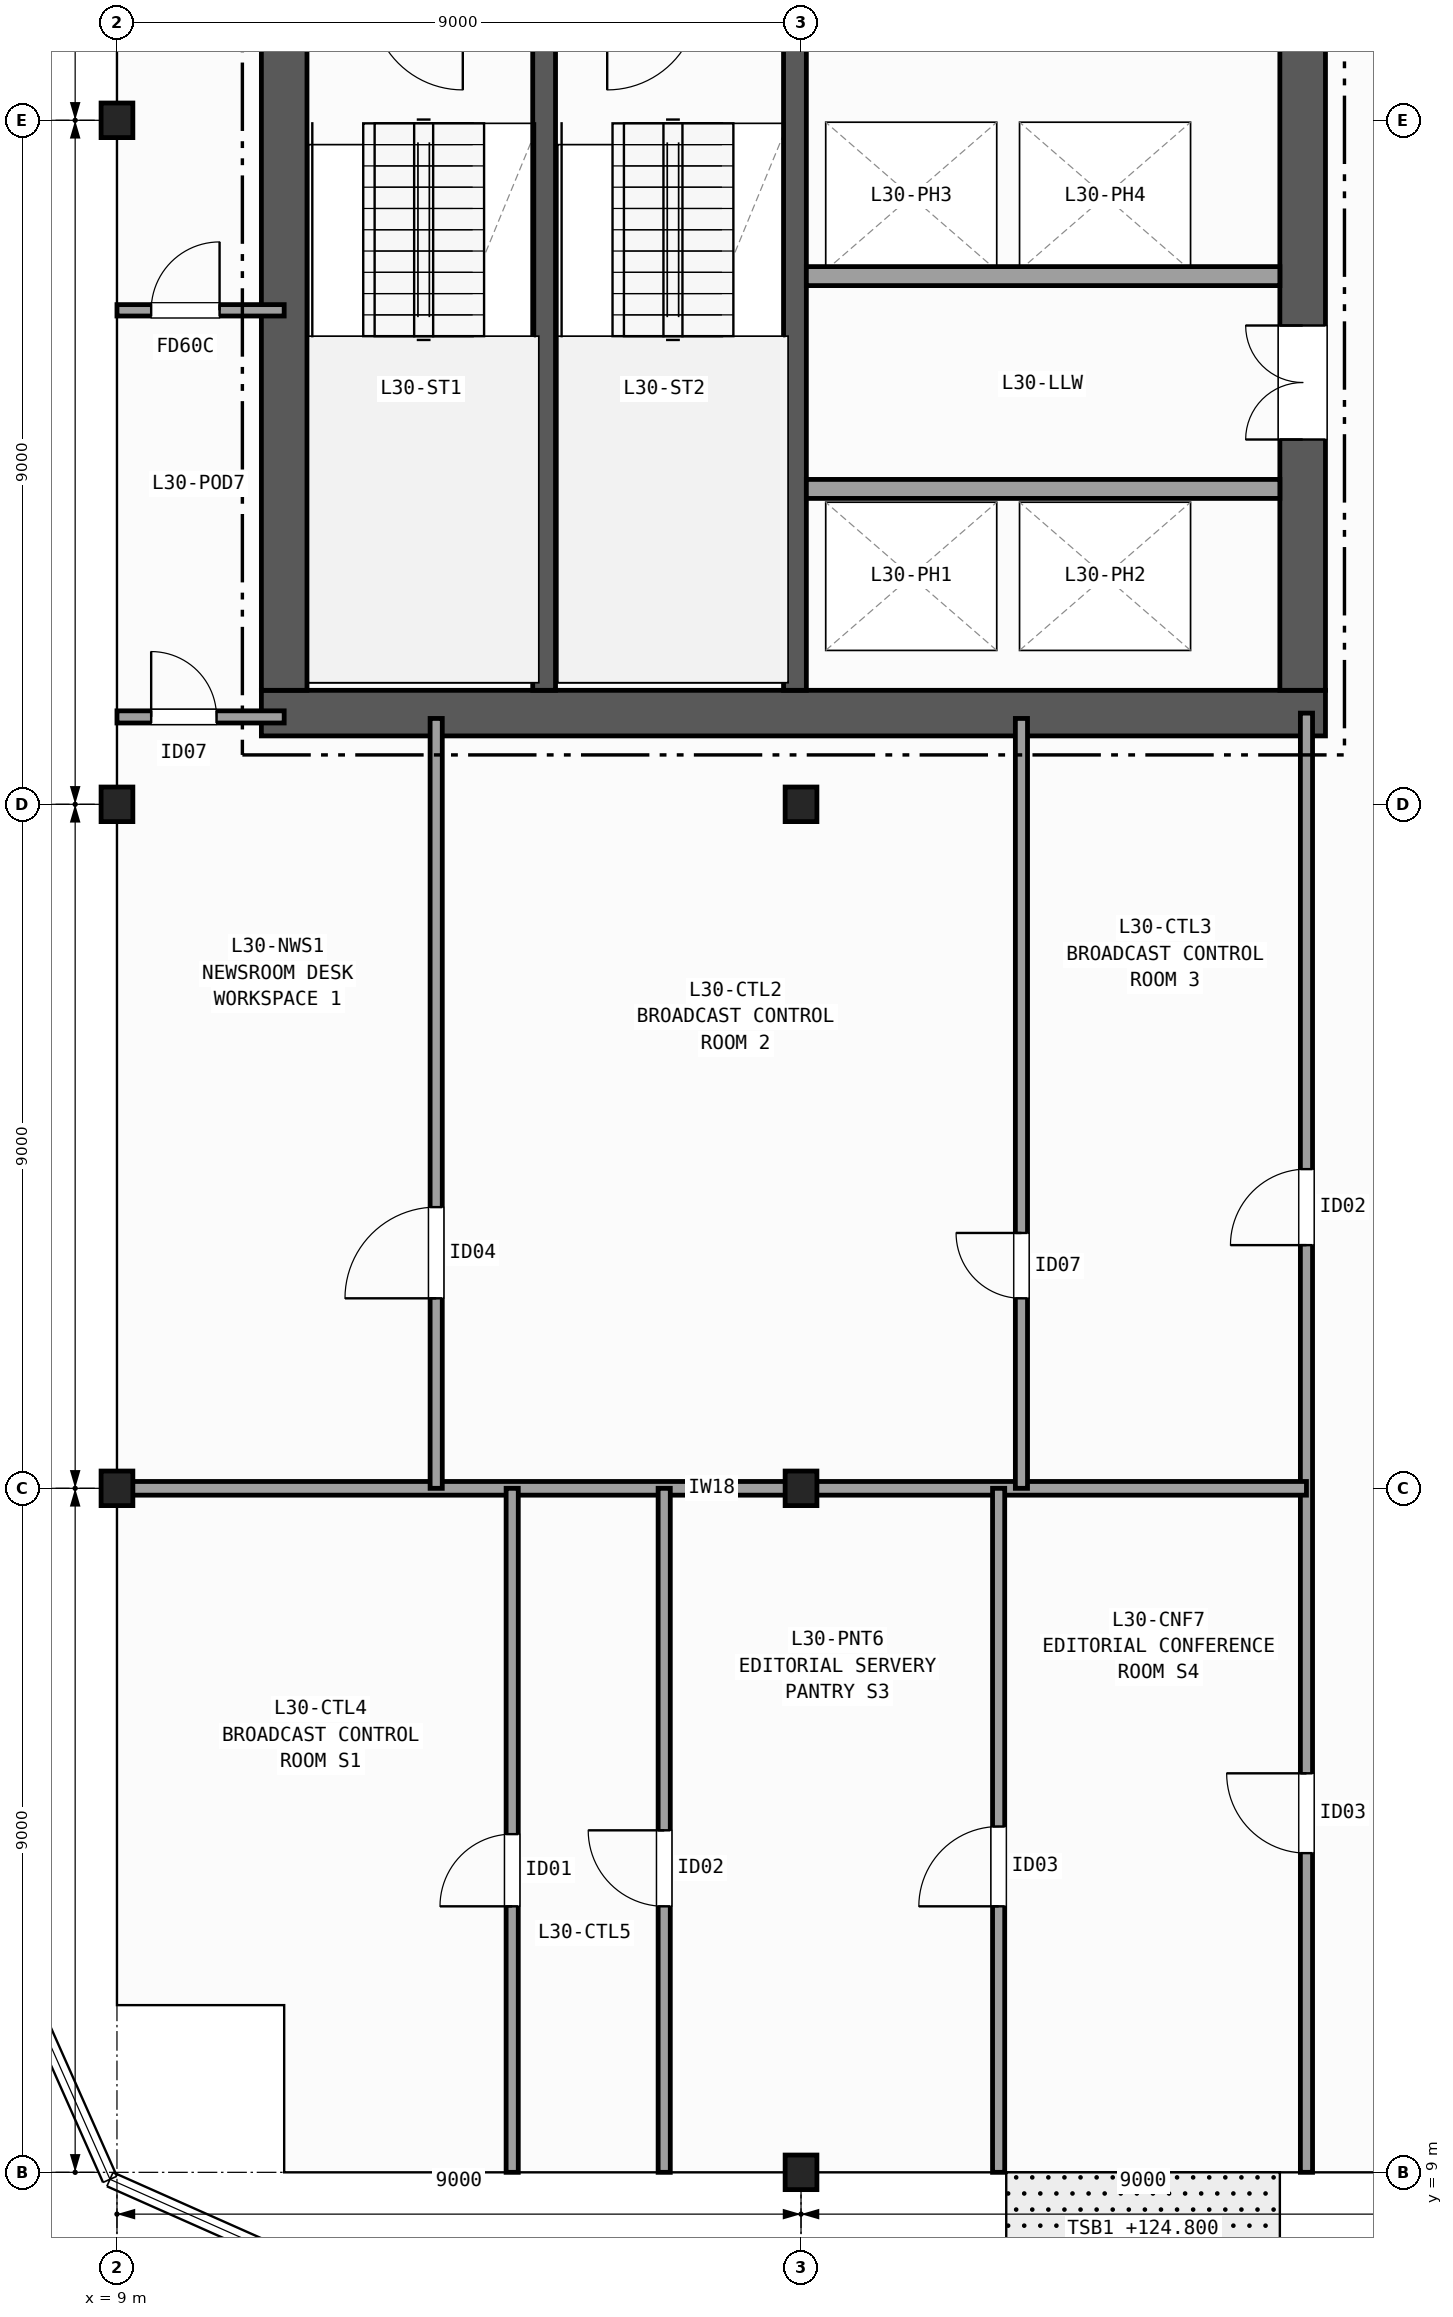
"""IFC4 building model, lengths in metres.
Left out: names, types, materials, properties, quantities, classifications, styles, units other than length and angle.
Written with IfcOpenShell. Run it as: python <this file> out.ifc"""

import sys

from ifc_helpers import new_model, si_unit, direction, frame, frame_2d, origin, origin_2d, place, context, subcontext, project, spatial, rectangle, i_section, extrude, element, fill, save


model = new_model("IFC4")
c1 = context("Model", 3, precision=1e-05, world=origin(), true_north=direction((0.0, 1.0)))
c2 = subcontext(c1, "Body", "Model", "MODEL_VIEW")
j1 = project(units=[si_unit("LENGTHUNIT", "METRE"), si_unit("PLANEANGLEUNIT", "RADIAN")], contexts=[c1])
p1 = place(None, origin())
s1 = spatial("IfcSite", under=j1, at=p1, CompositionType="ELEMENT")
p2 = place(p1, origin())
s2 = spatial("IfcBuilding", under=s1, at=p2, CompositionType="ELEMENT")
p3 = place(p2, frame((0.0, 0.0, 124.8)))
s3 = spatial("IfcBuildingStorey", under=s2, at=p3, CompositionType="ELEMENT", Elevation=124.8)
for number, where, z_axis, x_axis in (
    (1, (9.0, 18.0, 0.0), (0.0, 0.0, 1.0), (1.0, 0.0, 0.0)),
    (2, (9.0, 27.0, 0.0), (0.0, 0.0, 1.0), (1.0, 0.0, 0.0)),
    (3, (9.0, 36.0, 0.0), (0.0, 0.0, 1.0), (1.0, 0.0, 0.0)),
    (4, (18.0, 9.0, 0.0), (0.0, 0.0, 1.0), (1.0, 0.0, 0.0)),
    (5, (18.0, 18.0, 0.0), (0.0, 0.0, 1.0), (1.0, 0.0, 0.0)),
    (6, (18.0, 27.0, 0.0), (0.0, 0.0, 1.0), (1.0, 0.0, 0.0)),
):
    element("IfcColumn", number, at=place(p3, frame(where, z_axis=z_axis, x_axis=x_axis)), inside=s3, PredefinedType="COLUMN", context=c2, shape_type="SweptSolid", body=[
        extrude(i_section(OverallWidth=0.418, OverallDepth=0.455, WebThickness=0.042, FlangeThickness=0.068, FilletRadius=0.015, at=origin_2d()), origin(), (0.0, 0.0, 1.0), 3.7),
    ])
p4 = place(p3, frame((10.9, 28.2, 0.0), z_axis=(0.0, 0.0, 1.0), x_axis=(1.0, 0.0, 0.0)))
e7 = element("IfcWall", 7, at=p4, inside=s3, PredefinedType="SHEAR", context=c2, shape_type="SweptSolid", body=[
    extrude(rectangle(XDim=14.0, YDim=0.6, at=frame_2d((7.0, 0.0))), origin(), (0.0, 0.0, 1.0), 3.42),
])
p5 = place(p3, frame((11.2, 42.1, 0.0), z_axis=(0.0, 0.0, 1.0), x_axis=(0.0, -1.0, 0.0)))
e8 = element("IfcWall", 8, at=p5, inside=s3, PredefinedType="SHEAR", context=c2, shape_type="SweptSolid", body=[
    extrude(rectangle(XDim=13.6, YDim=0.6, at=frame_2d((6.8, 0.0))), origin(), (0.0, 0.0, 1.0), 3.42),
])
p6 = place(p3, frame((24.6, 28.5, 0.0), z_axis=(0.0, 0.0, 1.0), x_axis=(0.0, 1.0, 0.0)))
e9 = element("IfcWall", 9, at=p6, inside=s3, PredefinedType="SHEAR", context=c2, shape_type="SweptSolid", body=[
    extrude(rectangle(XDim=13.6, YDim=0.6, at=frame_2d((6.8, 0.0))), origin(), (0.0, 0.0, 1.0), 3.42),
])
p7 = place(p6, frame((3.3, 0.0, 0.0)))
e10 = element("IfcOpeningElement", 10, at=p7, cuts=e9, PredefinedType="OPENING", context=c2, shape_type="SweptSolid", body=[
    extrude(rectangle(XDim=1.5, YDim=2.2, at=frame_2d((0.75, 1.1))), frame((0.0, 0.31, 0.0), z_axis=(0.0, -1.0, 0.0), x_axis=(1.0, 0.0, 0.0)), (0.0, 0.0, 1.0), 0.62),
])
p8 = place(p6, frame((9.9, 0.0, 0.0)))
e11 = element("IfcOpeningElement", 11, at=p8, cuts=e9, PredefinedType="OPENING", context=c2, shape_type="SweptSolid", body=[
    extrude(rectangle(XDim=0.9, YDim=2.1, at=frame_2d((0.45, 1.05))), frame((0.0, 0.31, 0.0), z_axis=(0.0, -1.0, 0.0), x_axis=(1.0, 0.0, 0.0)), (0.0, 0.0, 1.0), 0.62),
])
p9 = place(p6, frame((12.0, 0.0, 0.0)))
e12 = element("IfcOpeningElement", 12, at=p9, cuts=e9, PredefinedType="OPENING", context=c2, shape_type="SweptSolid", body=[
    extrude(rectangle(XDim=0.9, YDim=2.1, at=frame_2d((0.45, 1.05))), frame((0.0, 0.31, 0.0), z_axis=(0.0, -1.0, 0.0), x_axis=(1.0, 0.0, 0.0)), (0.0, 0.0, 1.0), 0.62),
])
p10 = place(p3, frame((14.62, 28.5, 0.0), z_axis=(0.0, 0.0, 1.0), x_axis=(0.0, 1.0, 0.0)))
e13 = element("IfcWall", 13, at=p10, inside=s3, PredefinedType="SHEAR", context=c2, shape_type="SweptSolid", body=[
    extrude(rectangle(XDim=8.95, YDim=0.3, at=frame_2d((4.475, 0.0))), origin(), (0.0, 0.0, 1.0), 3.42),
])
p11 = place(p3, frame((17.92, 42.1, 0.0), z_axis=(0.0, 0.0, 1.0), x_axis=(0.0, -1.0, 0.0)))
e14 = element("IfcWall", 14, at=p11, inside=s3, PredefinedType="SHEAR", context=c2, shape_type="SweptSolid", body=[
    extrude(rectangle(XDim=13.6, YDim=0.3, at=frame_2d((6.8, 0.0))), origin(), (0.0, 0.0, 1.0), 3.42),
])
p12 = place(p11, frame((1.925, 0.0, 0.0)))
e15 = element("IfcOpeningElement", 15, at=p12, cuts=e14, PredefinedType="OPENING", context=c2, shape_type="SweptSolid", body=[
    extrude(rectangle(XDim=1.15, YDim=2.15, at=frame_2d((0.575, 1.075))), frame((0.0, 0.16, 0.0), z_axis=(0.0, -1.0, 0.0), x_axis=(1.0, 0.0, 0.0)), (0.0, 0.0, 1.0), 0.32),
])
for number, where, z_axis, x_axis in (
    (16, (18.07, 31.15, 0.0), (0.0, 0.0, 1.0), (1.0, 0.0, 0.0)),
    (17, (24.3, 33.95, 0.0), (0.0, 0.0, 1.0), (-1.0, 0.0, 0.0)),
):
    element("IfcWall", number, at=place(p3, frame(where, z_axis=z_axis, x_axis=x_axis)), inside=s3, PredefinedType="PARTITIONING", context=c2, shape_type="SweptSolid", body=[
        extrude(rectangle(XDim=6.23, YDim=0.25, at=frame_2d((3.115, 0.0))), origin(), (0.0, 0.0, 1.0), 3.42),
    ])
p13 = place(p3, frame((9.0, 28.15, 0.0), z_axis=(0.0, 0.0, 1.0), x_axis=(1.0, 0.0, 0.0)))
e18 = element("IfcWall", 18, at=p13, inside=s3, PredefinedType="PARTITIONING", context=c2, shape_type="SweptSolid", body=[
    extrude(rectangle(XDim=2.2, YDim=0.16, at=frame_2d((1.1, 0.0))), origin(), (0.0, 0.0, 1.0), 2.634),
])
p14 = place(p13, frame((0.45, 0.0, 0.0)))
e19 = element("IfcOpeningElement", 19, at=p14, cuts=e18, PredefinedType="OPENING", context=c2, shape_type="SweptSolid", body=[
    extrude(rectangle(XDim=0.86, YDim=2.05, at=frame_2d((0.43, 1.025))), frame((0.0, 0.09, 0.0), z_axis=(0.0, -1.0, 0.0), x_axis=(1.0, 0.0, 0.0)), (0.0, 0.0, 1.0), 0.18),
])
p15 = place(p3, frame((9.0, 33.5, 0.0), z_axis=(0.0, 0.0, 1.0), x_axis=(1.0, 0.0, 0.0)))
e20 = element("IfcWall", 20, at=p15, inside=s3, PredefinedType="PARTITIONING", context=c2, shape_type="SweptSolid", body=[
    extrude(rectangle(XDim=2.2, YDim=0.15, at=frame_2d((1.1, 0.0))), origin(), (0.0, 0.0, 1.0), 2.634),
])
p16 = place(p15, frame((0.45, 0.0, 0.0)))
e21 = element("IfcOpeningElement", 21, at=p16, cuts=e20, PredefinedType="OPENING", context=c2, shape_type="SweptSolid", body=[
    extrude(rectangle(XDim=0.9, YDim=2.1, at=frame_2d((0.45, 1.05))), frame((0.0, 0.085, 0.0), z_axis=(0.0, -1.0, 0.0), x_axis=(1.0, 0.0, 0.0)), (0.0, 0.0, 1.0), 0.17),
])
p17 = place(p3, frame((24.65, 9.0, 0.0), z_axis=(0.0, 0.0, 1.0), x_axis=(0.0, 1.0, 0.0)))
e22 = element("IfcWall", 22, at=p17, inside=s3, PredefinedType="PARTITIONING", context=c2, shape_type="SweptSolid", body=[
    extrude(rectangle(XDim=19.2, YDim=0.16, at=frame_2d((9.6, 0.0))), origin(), (0.0, 0.0, 1.0), 2.634),
])
p18 = place(p17, frame((12.2, 0.0, 0.0)))
e23 = element("IfcOpeningElement", 23, at=p18, cuts=e22, PredefinedType="OPENING", context=c2, shape_type="SweptSolid", body=[
    extrude(rectangle(XDim=1.0, YDim=2.1, at=frame_2d((0.5, 1.05))), frame((0.0, 0.09, 0.0), z_axis=(0.0, -1.0, 0.0), x_axis=(1.0, 0.0, 0.0)), (0.0, 0.0, 1.0), 0.18),
])
p19 = place(p17, frame((4.2, 0.0, 0.0)))
e24 = element("IfcOpeningElement", 24, at=p19, cuts=e22, PredefinedType="OPENING", context=c2, shape_type="SweptSolid", body=[
    extrude(rectangle(XDim=1.05, YDim=2.15, at=frame_2d((0.525, 1.075))), frame((0.0, 0.09, 0.0), z_axis=(0.0, -1.0, 0.0), x_axis=(1.0, 0.0, 0.0)), (0.0, 0.0, 1.0), 0.18),
])
p20 = place(p3, frame((9.0, 18.0, 0.0), z_axis=(0.0, 0.0, 1.0), x_axis=(1.0, 0.0, 0.0)))
e25 = element("IfcWall", 25, at=p20, inside=s3, PredefinedType="PARTITIONING", context=c2, shape_type="SweptSolid", body=[
    extrude(rectangle(XDim=15.65, YDim=0.18, at=frame_2d((7.825, 0.0))), origin(), (0.0, 0.0, 1.0), 2.634),
])
p21 = place(p3, frame((13.2, 18.0, 0.0), z_axis=(0.0, 0.0, 1.0), x_axis=(0.0, 1.0, 0.0)))
e26 = element("IfcWall", 26, at=p21, inside=s3, PredefinedType="PARTITIONING", context=c2, shape_type="SweptSolid", body=[
    extrude(rectangle(XDim=10.13, YDim=0.16, at=frame_2d((5.065, 0.0))), origin(), (0.0, 0.0, 1.0), 2.789),
])
p22 = place(p21, frame((2.5, 0.0, 0.0)))
e27 = element("IfcOpeningElement", 27, at=p22, cuts=e26, PredefinedType="OPENING", context=c2, shape_type="SweptSolid", body=[
    extrude(rectangle(XDim=1.2, YDim=2.15, at=frame_2d((0.6, 1.075))), frame((0.0, 0.09, 0.0), z_axis=(0.0, -1.0, 0.0), x_axis=(1.0, 0.0, 0.0)), (0.0, 0.0, 1.0), 0.18),
])
p23 = place(p3, frame((20.9, 18.0, 0.0), z_axis=(0.0, 0.0, 1.0), x_axis=(0.0, 1.0, 0.0)))
e28 = element("IfcWall", 28, at=p23, inside=s3, PredefinedType="PARTITIONING", context=c2, shape_type="SweptSolid", body=[
    extrude(rectangle(XDim=10.13, YDim=0.16, at=frame_2d((5.065, 0.0))), origin(), (0.0, 0.0, 1.0), 2.789),
])
p24 = place(p23, frame((2.5, 0.0, 0.0)))
e29 = element("IfcOpeningElement", 29, at=p24, cuts=e28, PredefinedType="OPENING", context=c2, shape_type="SweptSolid", body=[
    extrude(rectangle(XDim=0.86, YDim=2.05, at=frame_2d((0.43, 1.025))), frame((0.0, 0.09, 0.0), z_axis=(0.0, -1.0, 0.0), x_axis=(1.0, 0.0, 0.0)), (0.0, 0.0, 1.0), 0.18),
])
p25 = place(p3, frame((14.2, 9.0, 0.0), z_axis=(0.0, 0.0, 1.0), x_axis=(0.0, 1.0, 0.0)))
e30 = element("IfcWall", 30, at=p25, inside=s3, PredefinedType="PARTITIONING", context=c2, shape_type="SweptSolid", body=[
    extrude(rectangle(XDim=9.0, YDim=0.16, at=frame_2d((4.5, 0.0))), origin(), (0.0, 0.0, 1.0), 2.789),
])
p26 = place(p25, frame((3.5, 0.0, 0.0)))
e31 = element("IfcOpeningElement", 31, at=p26, cuts=e30, PredefinedType="OPENING", context=c2, shape_type="SweptSolid", body=[
    extrude(rectangle(XDim=0.95, YDim=2.1, at=frame_2d((0.475, 1.05))), frame((0.0, 0.09, 0.0), z_axis=(0.0, -1.0, 0.0), x_axis=(1.0, 0.0, 0.0)), (0.0, 0.0, 1.0), 0.18),
])
p27 = place(p3, frame((16.2, 9.0, 0.0), z_axis=(0.0, 0.0, 1.0), x_axis=(0.0, 1.0, 0.0)))
e32 = element("IfcWall", 32, at=p27, inside=s3, PredefinedType="PARTITIONING", context=c2, shape_type="SweptSolid", body=[
    extrude(rectangle(XDim=9.0, YDim=0.16, at=frame_2d((4.5, 0.0))), origin(), (0.0, 0.0, 1.0), 2.789),
])
p28 = place(p27, frame((3.5, 0.0, 0.0)))
e33 = element("IfcOpeningElement", 33, at=p28, cuts=e32, PredefinedType="OPENING", context=c2, shape_type="SweptSolid", body=[
    extrude(rectangle(XDim=1.0, YDim=2.1, at=frame_2d((0.5, 1.05))), frame((0.0, 0.09, 0.0), z_axis=(0.0, -1.0, 0.0), x_axis=(1.0, 0.0, 0.0)), (0.0, 0.0, 1.0), 0.18),
])
p29 = place(p3, frame((20.6, 9.0, 0.0), z_axis=(0.0, 0.0, 1.0), x_axis=(0.0, 1.0, 0.0)))
e34 = element("IfcWall", 34, at=p29, inside=s3, PredefinedType="PARTITIONING", context=c2, shape_type="SweptSolid", body=[
    extrude(rectangle(XDim=9.0, YDim=0.16, at=frame_2d((4.5, 0.0))), origin(), (0.0, 0.0, 1.0), 2.634),
])
p30 = place(p29, frame((3.5, 0.0, 0.0)))
e35 = element("IfcOpeningElement", 35, at=p30, cuts=e34, PredefinedType="OPENING", context=c2, shape_type="SweptSolid", body=[
    extrude(rectangle(XDim=1.05, YDim=2.15, at=frame_2d((0.525, 1.075))), frame((0.0, 0.09, 0.0), z_axis=(0.0, -1.0, 0.0), x_axis=(1.0, 0.0, 0.0)), (0.0, 0.0, 1.0), 0.18),
])
p31 = place(p7, origin())
e36 = element("IfcDoor", 36, at=p31, inside=s3, OperationType="DOUBLE_DOOR_SINGLE_SWING", PredefinedType="DOOR", context=c2, shape_type="SweptSolid", body=[
    extrude(rectangle(XDim=1.5, YDim=2.2, at=frame_2d((0.75, 1.1))), frame((0.0, 0.025, 0.0), z_axis=(0.0, -1.0, 0.0), x_axis=(1.0, 0.0, 0.0)), (0.0, 0.0, 1.0), 0.05),
])
fill(e10, e36)
p32 = place(p14, origin())
e37 = element("IfcDoor", 37, at=p32, inside=s3, OperationType="SINGLE_SWING_LEFT", PredefinedType="DOOR", context=c2, shape_type="SweptSolid", body=[
    extrude(rectangle(XDim=0.86, YDim=2.05, at=frame_2d((0.43, 1.025))), frame((0.0, 0.025, 0.0), z_axis=(0.0, -1.0, 0.0), x_axis=(1.0, 0.0, 0.0)), (0.0, 0.0, 1.0), 0.05),
])
fill(e19, e37)
p33 = place(p16, origin())
e38 = element("IfcDoor", 38, at=p33, inside=s3, OperationType="SINGLE_SWING_RIGHT", PredefinedType="DOOR", context=c2, shape_type="SweptSolid", body=[
    extrude(rectangle(XDim=0.9, YDim=2.1, at=frame_2d((0.45, 1.05))), frame((0.0, 0.025, 0.0), z_axis=(0.0, -1.0, 0.0), x_axis=(1.0, 0.0, 0.0)), (0.0, 0.0, 1.0), 0.05),
])
fill(e21, e38)
p34 = place(p18, origin())
e39 = element("IfcDoor", 39, at=p34, inside=s3, OperationType="SINGLE_SWING_LEFT", PredefinedType="DOOR", context=c2, shape_type="SweptSolid", body=[
    extrude(rectangle(XDim=1.0, YDim=2.1, at=frame_2d((0.5, 1.05))), frame((0.0, 0.025, 0.0), z_axis=(0.0, -1.0, 0.0), x_axis=(1.0, 0.0, 0.0)), (0.0, 0.0, 1.0), 0.05),
])
fill(e23, e39)
p35 = place(p19, origin())
e40 = element("IfcDoor", 40, at=p35, inside=s3, OperationType="SINGLE_SWING_RIGHT", PredefinedType="DOOR", context=c2, shape_type="SweptSolid", body=[
    extrude(rectangle(XDim=1.05, YDim=2.15, at=frame_2d((0.525, 1.075))), frame((0.0, 0.025, 0.0), z_axis=(0.0, -1.0, 0.0), x_axis=(1.0, 0.0, 0.0)), (0.0, 0.0, 1.0), 0.05),
])
fill(e24, e40)
p36 = place(p22, origin())
e41 = element("IfcDoor", 41, at=p36, inside=s3, OperationType="SINGLE_SWING_LEFT", PredefinedType="DOOR", context=c2, shape_type="SweptSolid", body=[
    extrude(rectangle(XDim=1.2, YDim=2.15, at=frame_2d((0.6, 1.075))), frame((0.0, 0.025, 0.0), z_axis=(0.0, -1.0, 0.0), x_axis=(1.0, 0.0, 0.0)), (0.0, 0.0, 1.0), 0.05),
])
fill(e27, e41)
p37 = place(p24, origin())
e42 = element("IfcDoor", 42, at=p37, inside=s3, OperationType="SINGLE_SWING_RIGHT", PredefinedType="DOOR", context=c2, shape_type="SweptSolid", body=[
    extrude(rectangle(XDim=0.86, YDim=2.05, at=frame_2d((0.43, 1.025))), frame((0.0, 0.025, 0.0), z_axis=(0.0, -1.0, 0.0), x_axis=(1.0, 0.0, 0.0)), (0.0, 0.0, 1.0), 0.05),
])
fill(e29, e42)
p38 = place(p26, origin())
e43 = element("IfcDoor", 43, at=p38, inside=s3, OperationType="SINGLE_SWING_LEFT", PredefinedType="DOOR", context=c2, shape_type="SweptSolid", body=[
    extrude(rectangle(XDim=0.95, YDim=2.1, at=frame_2d((0.475, 1.05))), frame((0.0, 0.025, 0.0), z_axis=(0.0, -1.0, 0.0), x_axis=(1.0, 0.0, 0.0)), (0.0, 0.0, 1.0), 0.05),
])
fill(e31, e43)
p39 = place(p28, origin())
e44 = element("IfcDoor", 44, at=p39, inside=s3, OperationType="SINGLE_SWING_RIGHT", PredefinedType="DOOR", context=c2, shape_type="SweptSolid", body=[
    extrude(rectangle(XDim=1.0, YDim=2.1, at=frame_2d((0.5, 1.05))), frame((0.0, 0.025, 0.0), z_axis=(0.0, -1.0, 0.0), x_axis=(1.0, 0.0, 0.0)), (0.0, 0.0, 1.0), 0.05),
])
fill(e33, e44)
p40 = place(p30, origin())
e45 = element("IfcDoor", 45, at=p40, inside=s3, OperationType="SINGLE_SWING_LEFT", PredefinedType="DOOR", context=c2, shape_type="SweptSolid", body=[
    extrude(rectangle(XDim=1.05, YDim=2.15, at=frame_2d((0.525, 1.075))), frame((0.0, 0.025, 0.0), z_axis=(0.0, -1.0, 0.0), x_axis=(1.0, 0.0, 0.0)), (0.0, 0.0, 1.0), 0.05),
])
fill(e35, e45)
save(model, sys.argv[1])
